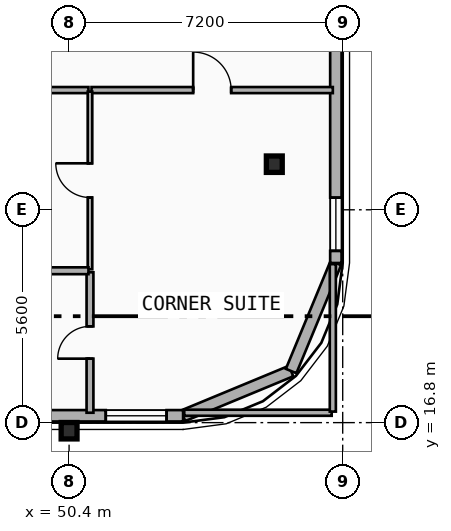
"""IFC4 building model, lengths in metres.
Left out: names, types, materials, properties, quantities, classifications, styles, units other than length and angle.
Written with IfcOpenShell. Run it as: python <this file> out.ifc"""

import sys

from ifc_helpers import new_model, si_unit, direction, frame, frame_2d, origin, origin_2d, place, context, subcontext, project, spatial, rectangle, i_section, extrude, element, fill, save


model = new_model("IFC4")
c1 = context("Model", 3, precision=1e-05, world=origin(), true_north=direction((0.0, 1.0)))
c2 = subcontext(c1, "Body", "Model", "MODEL_VIEW")
j1 = project(units=[si_unit("LENGTHUNIT", "METRE"), si_unit("PLANEANGLEUNIT", "RADIAN")], contexts=[c1])
p1 = place(None, origin())
s1 = spatial("IfcSite", under=j1, at=p1, CompositionType="ELEMENT")
p2 = place(p1, origin())
s2 = spatial("IfcBuilding", under=s1, at=p2, CompositionType="ELEMENT")
p3 = place(p2, frame((0.0, 0.0, 115.3)))
s3 = spatial("IfcBuildingStorey", under=s2, at=p3, CompositionType="ELEMENT", Elevation=115.3)
p4 = place(p3, frame((50.4, 16.683, 0.0), z_axis=(0.0, -0.079891690793, 0.996803550226), x_axis=(1.0, 0.0, 0.0)))
e1 = element("IfcColumn", 1, at=p4, inside=s3, PredefinedType="COLUMN", context=c2, shape_type="SweptSolid", body=[
    extrude(i_section(OverallWidth=0.418, OverallDepth=0.432, WebThickness=0.035, FlangeThickness=0.056, FilletRadius=0.015, at=origin_2d()), origin(), (0.0, 0.0, 1.0), 3.511),
])
p5 = place(p3, frame((55.8, 23.6, 0.0), z_axis=(0.0, 0.0, 1.0), x_axis=(1.0, 0.0, 0.0)))
e2 = element("IfcColumn", 2, at=p5, inside=s3, PredefinedType="COLUMN", context=c2, shape_type="SweptSolid", body=[
    extrude(i_section(OverallWidth=0.418, OverallDepth=0.432, WebThickness=0.035, FlangeThickness=0.056, FilletRadius=0.015, at=origin_2d()), origin(), (0.0, 0.0, 1.0), 3.5),
])
p6 = place(p3, frame((56.243, 18.157, 0.0), z_axis=(0.0, 0.0, 1.0), x_axis=(-0.923882414032, -0.382676475685, 0.0)))
e3 = element("IfcWall", 3, at=p6, inside=s3, PredefinedType="SOLIDWALL", context=c2, shape_type="SweptSolid", body=[
    extrude(rectangle(XDim=3.077, YDim=0.3, at=frame_2d((1.539, 0.0))), origin(), (0.0, 0.0, 1.0), 3.24),
])
p7 = place(p3, frame((57.42, 21.0, 0.0), z_axis=(0.0, 0.0, 1.0), x_axis=(-0.382636798336, -0.92389884758, 0.0)))
e4 = element("IfcWall", 4, at=p7, inside=s3, PredefinedType="SOLIDWALL", context=c2, shape_type="SweptSolid", body=[
    extrude(rectangle(XDim=3.077, YDim=0.3, at=frame_2d((1.538, 0.0))), origin(), (0.0, 0.0, 1.0), 3.24),
])
p8 = place(p3, frame((57.42, 39.0, 0.0), z_axis=(0.0, 0.0, 1.0), x_axis=(0.0, -1.0, 0.0)))
e5 = element("IfcWall", 5, at=p8, inside=s3, PredefinedType="SOLIDWALL", context=c2, shape_type="SweptSolid", body=[
    extrude(rectangle(XDim=18.0, YDim=0.3, at=frame_2d((9.0, 0.0))), origin(), (0.0, 0.0, 1.0), 3.24),
])
p9 = place(p8, frame((8.882, 0.0, 0.48)))
e6 = element("IfcOpeningElement", 6, at=p9, cuts=e5, PredefinedType="OPENING", context=c2, shape_type="SweptSolid", body=[
    extrude(rectangle(XDim=1.4, YDim=1.8, at=frame_2d((0.7, 0.9))), frame((0.0, 0.16, 0.0), z_axis=(0.0, -1.0, 0.0), x_axis=(1.0, 0.0, 0.0)), (0.0, 0.0, 1.0), 0.32),
])
p10 = place(p8, frame((3.621, 0.0, 0.48)))
e7 = element("IfcOpeningElement", 7, at=p10, cuts=e5, PredefinedType="OPENING", context=c2, shape_type="SweptSolid", body=[
    extrude(rectangle(XDim=1.4, YDim=1.8, at=frame_2d((0.7, 0.9))), frame((0.0, 0.16, 0.0), z_axis=(0.0, -1.0, 0.0), x_axis=(1.0, 0.0, 0.0)), (0.0, 0.0, 1.0), 0.32),
])
p11 = place(p8, frame((16.28, 0.0, 0.65)))
e8 = element("IfcOpeningElement", 8, at=p11, cuts=e5, PredefinedType="OPENING", context=c2, shape_type="SweptSolid", body=[
    extrude(rectangle(XDim=1.4, YDim=1.8, at=frame_2d((0.7, 0.9))), frame((0.0, 0.16, 0.0), z_axis=(0.0, -1.0, 0.0), x_axis=(1.0, 0.0, 0.0)), (0.0, 0.0, 1.0), 0.32),
])
p12 = place(p3, frame((53.4, 16.98, 0.0), z_axis=(0.0, 0.0, 1.0), x_axis=(-1.0, 0.0, 0.0)))
e9 = element("IfcWall", 9, at=p12, inside=s3, PredefinedType="SOLIDWALL", context=c2, shape_type="SweptSolid", body=[
    extrude(rectangle(XDim=49.2, YDim=0.3, at=frame_2d((24.6, 0.0))), origin(), (0.0, 0.0, 1.0), 3.24),
])
p13 = place(p12, frame((42.811, 0.0, 0.8)))
e10 = element("IfcOpeningElement", 10, at=p13, cuts=e9, PredefinedType="OPENING", context=c2, shape_type="SweptSolid", body=[
    extrude(rectangle(XDim=1.6, YDim=1.95, at=frame_2d((0.8, 0.975))), frame((0.0, 0.16, 0.0), z_axis=(0.0, -1.0, 0.0), x_axis=(1.0, 0.0, 0.0)), (0.0, 0.0, 1.0), 0.32),
])
p14 = place(p12, frame((28.7, 0.0, 0.65)))
e11 = element("IfcOpeningElement", 11, at=p14, cuts=e9, PredefinedType="OPENING", context=c2, shape_type="SweptSolid", body=[
    extrude(rectangle(XDim=1.6, YDim=1.95, at=frame_2d((0.8, 0.975))), frame((0.0, 0.16, 0.0), z_axis=(0.0, -1.0, 0.0), x_axis=(1.0, 0.0, 0.0)), (0.0, 0.0, 1.0), 0.32),
])
p15 = place(p12, frame((5.1, 0.0, 0.8)))
e12 = element("IfcOpeningElement", 12, at=p15, cuts=e9, PredefinedType="OPENING", context=c2, shape_type="SweptSolid", body=[
    extrude(rectangle(XDim=1.6, YDim=1.95, at=frame_2d((0.8, 0.975))), frame((0.0, 0.16, 0.0), z_axis=(0.0, -1.0, 0.0), x_axis=(1.0, 0.0, 0.0)), (0.0, 0.0, 1.0), 0.32),
])
p16 = place(p12, frame((0.435, 0.0, 0.48)))
e13 = element("IfcOpeningElement", 13, at=p16, cuts=e9, PredefinedType="OPENING", context=c2, shape_type="SweptSolid", body=[
    extrude(rectangle(XDim=1.6, YDim=1.95, at=frame_2d((0.8, 0.975))), frame((0.0, 0.16, 0.0), z_axis=(0.0, -1.0, 0.0), x_axis=(1.0, 0.0, 0.0)), (0.0, 0.0, 1.0), 0.32),
])
p17 = place(p3, frame((50.99, 25.55, 0.0), z_axis=(0.0, 0.0, 1.0), x_axis=(1.0, 0.0, 0.0)))
e14 = element("IfcWall", 14, at=p17, inside=s3, PredefinedType="PARTITIONING", context=c2, shape_type="SweptSolid", body=[
    extrude(rectangle(XDim=6.35, YDim=0.16, at=frame_2d((3.175, 0.0))), origin(), (0.0, 0.0, 1.0), 2.57),
])
p18 = place(p17, frame((2.675, 0.0, 0.0)))
e15 = element("IfcOpeningElement", 15, at=p18, cuts=e14, PredefinedType="OPENING", context=c2, shape_type="SweptSolid", body=[
    extrude(rectangle(XDim=1.0, YDim=2.15, at=frame_2d((0.5, 1.075))), frame((0.0, 0.09, 0.0), z_axis=(0.0, -1.0, 0.0), x_axis=(1.0, 0.0, 0.0)), (0.0, 0.0, 1.0), 0.18),
])
p19 = place(p3, frame((48.64, 25.55, 0.0), z_axis=(0.0, 0.0, 1.0), x_axis=(1.0, 0.0, 0.0)))
e16 = element("IfcWall", 16, at=p19, inside=s3, PredefinedType="PARTITIONING", context=c2, shape_type="SweptSolid", body=[
    extrude(rectangle(XDim=2.27, YDim=0.16, at=frame_2d((1.135, 0.0))), origin(), (0.0, 0.0, 1.0), 2.57),
])
p20 = place(p3, frame((50.95, 17.06, 0.0), z_axis=(0.0, 0.0, 1.0), x_axis=(0.0, 1.0, 0.0)))
e17 = element("IfcWall", 17, at=p20, inside=s3, PredefinedType="PLUMBINGWALL", context=c2, shape_type="SweptSolid", body=[
    extrude(rectangle(XDim=3.696, YDim=0.18, at=frame_2d((1.848, 0.0))), origin(), (0.0, 0.0, 1.0), 2.57),
])
p21 = place(p20, frame((1.423, 0.0, 0.0)))
e18 = element("IfcOpeningElement", 18, at=p21, cuts=e17, PredefinedType="OPENING", context=c2, shape_type="SweptSolid", body=[
    extrude(rectangle(XDim=0.85, YDim=2.1, at=frame_2d((0.425, 1.05))), frame((0.0, 0.1, 0.0), z_axis=(0.0, -1.0, 0.0), x_axis=(1.0, 0.0, 0.0)), (0.0, 0.0, 1.0), 0.2),
])
p22 = place(p3, frame((50.95, 20.836, 0.0), z_axis=(0.0, 0.0, 1.0), x_axis=(0.0, 1.0, 0.0)))
e19 = element("IfcWall", 19, at=p22, inside=s3, PredefinedType="PARTITIONING", context=c2, shape_type="SweptSolid", body=[
    extrude(rectangle(XDim=4.674, YDim=0.12, at=frame_2d((2.337, 0.0))), origin(), (0.0, 0.0, 1.0), 2.57),
])
p23 = place(p22, frame((1.887, 0.0, 0.0)))
e20 = element("IfcOpeningElement", 20, at=p23, cuts=e19, PredefinedType="OPENING", context=c2, shape_type="SweptSolid", body=[
    extrude(rectangle(XDim=0.9, YDim=2.1, at=frame_2d((0.45, 1.05))), frame((0.0, 0.07, 0.0), z_axis=(0.0, -1.0, 0.0), x_axis=(1.0, 0.0, 0.0)), (0.0, 0.0, 1.0), 0.14),
])
p24 = place(p3, frame((48.64, 20.796, 0.0), z_axis=(0.0, 0.0, 1.0), x_axis=(1.0, 0.0, 0.0)))
e21 = element("IfcWall", 21, at=p24, inside=s3, PredefinedType="PLUMBINGWALL", context=c2, shape_type="SweptSolid", body=[
    extrude(rectangle(XDim=2.27, YDim=0.18, at=frame_2d((1.135, 0.0))), origin(), (0.0, 0.0, 1.0), 2.57),
])
p25 = place(p3, frame((53.43, 17.06, 0.0), z_axis=(0.0, 0.0, 1.0), x_axis=(1.0, 0.0, 0.0)))
e22 = element("IfcWall", 22, at=p25, inside=s3, PredefinedType="PARTITIONING", context=c2, shape_type="SweptSolid", body=[
    extrude(rectangle(XDim=3.88, YDim=0.16, at=frame_2d((1.94, 0.0))), origin(), (0.0, 0.0, 1.0), 2.72),
])
p26 = place(p3, frame((57.34, 17.09, 0.0), z_axis=(0.0, 0.0, 1.0), x_axis=(0.0, 1.0, 0.0)))
e23 = element("IfcWall", 23, at=p26, inside=s3, PredefinedType="PARTITIONING", context=c2, shape_type="SweptSolid", body=[
    extrude(rectangle(XDim=3.88, YDim=0.16, at=frame_2d((1.94, 0.0))), origin(), (0.0, 0.0, 1.0), 3.24),
])
p27 = place(p11, origin())
e24 = element("IfcWindow", 24, at=p27, inside=s3, PartitioningType="SINGLE_PANEL", PredefinedType="WINDOW", context=c2, shape_type="SweptSolid", body=[
    extrude(rectangle(XDim=1.4, YDim=1.8, at=frame_2d((0.7, 0.9))), frame((0.0, 0.03, 0.0), z_axis=(0.0, -1.0, 0.0), x_axis=(1.0, 0.0, 0.0)), (0.0, 0.0, 1.0), 0.06),
])
fill(e8, e24)
p28 = place(p16, origin())
e25 = element("IfcWindow", 25, at=p28, inside=s3, PartitioningType="SINGLE_PANEL", PredefinedType="WINDOW", context=c2, shape_type="SweptSolid", body=[
    extrude(rectangle(XDim=1.6, YDim=1.95, at=frame_2d((0.8, 0.975))), frame((0.0, 0.03, 0.0), z_axis=(0.0, -1.0, 0.0), x_axis=(1.0, 0.0, 0.0)), (0.0, 0.0, 1.0), 0.06),
])
fill(e13, e25)
p29 = place(p18, origin())
e26 = element("IfcDoor", 26, at=p29, inside=s3, OperationType="SINGLE_SWING_LEFT", PredefinedType="DOOR", context=c2, shape_type="SweptSolid", body=[
    extrude(rectangle(XDim=1.0, YDim=2.15, at=frame_2d((0.5, 1.075))), frame((0.0, 0.025, 0.0), z_axis=(0.0, -1.0, 0.0), x_axis=(1.0, 0.0, 0.0)), (0.0, 0.0, 1.0), 0.05),
])
fill(e15, e26)
p30 = place(p21, origin())
e27 = element("IfcDoor", 27, at=p30, inside=s3, OperationType="SINGLE_SWING_LEFT", PredefinedType="DOOR", context=c2, shape_type="SweptSolid", body=[
    extrude(rectangle(XDim=0.85, YDim=2.1, at=frame_2d((0.425, 1.05))), frame((0.0, 0.025, 0.0), z_axis=(0.0, -1.0, 0.0), x_axis=(1.0, 0.0, 0.0)), (0.0, 0.0, 1.0), 0.05),
])
fill(e18, e27)
p31 = place(p23, origin())
e28 = element("IfcDoor", 28, at=p31, inside=s3, OperationType="SINGLE_SWING_RIGHT", PredefinedType="DOOR", context=c2, shape_type="SweptSolid", body=[
    extrude(rectangle(XDim=0.9, YDim=2.1, at=frame_2d((0.45, 1.05))), frame((0.0, 0.025, 0.0), z_axis=(0.0, -1.0, 0.0), x_axis=(1.0, 0.0, 0.0)), (0.0, 0.0, 1.0), 0.05),
])
fill(e20, e28)
save(model, sys.argv[1])
